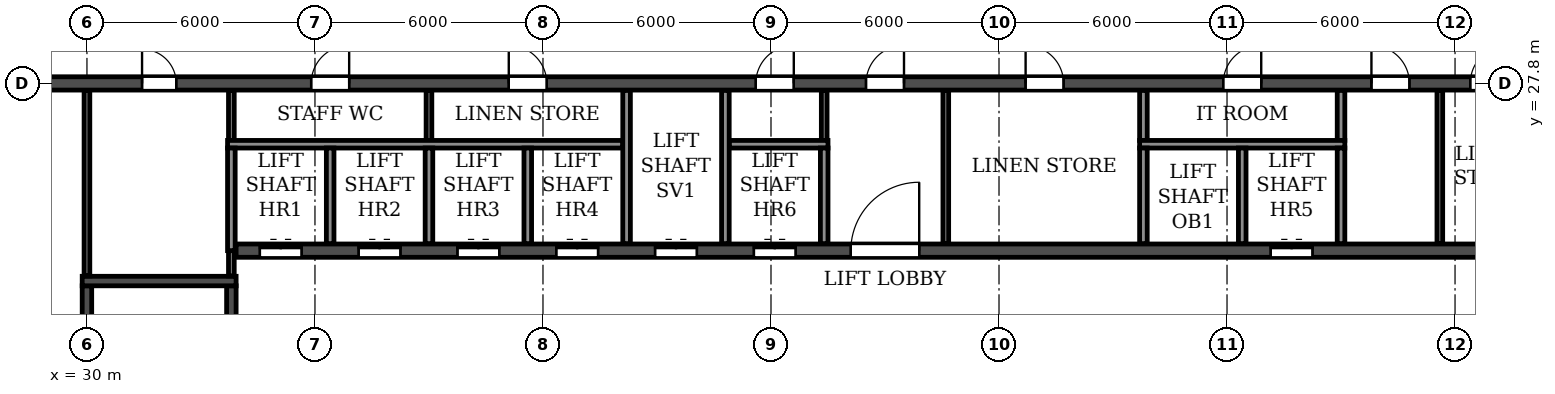
"""IFC4 building model, lengths in metres.
Left out: names, types, materials, properties, quantities, classifications, styles, units other than length and angle.
Written with IfcOpenShell. Run it as: python <this file> out.ifc"""

import sys

from ifc_helpers import new_model, si_unit, direction, frame, frame_2d, origin, place, context, subcontext, project, spatial, rectangle, extrude, element, fill, save


model = new_model("IFC4")
c1 = context("Model", 3, precision=1e-05, world=origin(), true_north=direction((0.0, 1.0)))
c2 = subcontext(c1, "Body", "Model", "MODEL_VIEW")
j1 = project(units=[si_unit("LENGTHUNIT", "METRE"), si_unit("PLANEANGLEUNIT", "RADIAN")], contexts=[c1])
p1 = place(None, origin())
s1 = spatial("IfcSite", under=j1, at=p1, CompositionType="ELEMENT")
p2 = place(p1, origin())
s2 = spatial("IfcBuilding", under=s1, at=p2, CompositionType="ELEMENT")
p3 = place(p2, frame((0.0, 0.0, 241.2)))
s3 = spatial("IfcBuildingStorey", under=s2, at=p3, CompositionType="ELEMENT", Elevation=241.2)
p4 = place(p3, frame((18.2, 27.8, 0.0), z_axis=(0.0, 0.0, 1.0), x_axis=(1.0, 0.0, 0.0)))
e1 = element("IfcWall", 1, at=p4, inside=s3, PredefinedType="SOLIDWALL", context=c2, shape_type="SweptSolid", body=[
    extrude(rectangle(XDim=65.6, YDim=0.35, at=frame_2d((32.8, 0.0))), origin(), (0.0, 0.0, 1.0), 3.08),
])
p5 = place(p4, frame((0.7, 0.0, 0.0)))
e2 = element("IfcOpeningElement", 2, at=p5, cuts=e1, PredefinedType="OPENING", context=c2, shape_type="SweptSolid", body=[
    extrude(rectangle(XDim=1.0, YDim=2.1, at=frame_2d((0.5, 1.05))), frame((0.0, 0.185, 0.0), z_axis=(0.0, -1.0, 0.0), x_axis=(1.0, 0.0, 0.0)), (0.0, 0.0, 1.0), 0.37),
])
p6 = place(p4, frame((4.05, 0.0, 0.0)))
e3 = element("IfcOpeningElement", 3, at=p6, cuts=e1, PredefinedType="OPENING", context=c2, shape_type="SweptSolid", body=[
    extrude(rectangle(XDim=0.9, YDim=2.1, at=frame_2d((0.45, 1.05))), frame((0.0, 0.185, 0.0), z_axis=(0.0, -1.0, 0.0), x_axis=(1.0, 0.0, 0.0)), (0.0, 0.0, 1.0), 0.37),
])
p7 = place(p4, frame((13.25, 0.0, 0.0)))
e4 = element("IfcOpeningElement", 4, at=p7, cuts=e1, PredefinedType="OPENING", context=c2, shape_type="SweptSolid", body=[
    extrude(rectangle(XDim=0.9, YDim=2.1, at=frame_2d((0.45, 1.05))), frame((0.0, 0.185, 0.0), z_axis=(0.0, -1.0, 0.0), x_axis=(1.0, 0.0, 0.0)), (0.0, 0.0, 1.0), 0.37),
])
p8 = place(p4, frame((17.7, 0.0, 0.0)))
e5 = element("IfcOpeningElement", 5, at=p8, cuts=e1, PredefinedType="OPENING", context=c2, shape_type="SweptSolid", body=[
    extrude(rectangle(XDim=1.0, YDim=2.1, at=frame_2d((0.5, 1.05))), frame((0.0, 0.185, 0.0), z_axis=(0.0, -1.0, 0.0), x_axis=(1.0, 0.0, 0.0)), (0.0, 0.0, 1.0), 0.37),
])
p9 = place(p4, frame((22.9, 0.0, 0.0)))
e6 = element("IfcOpeningElement", 6, at=p9, cuts=e1, PredefinedType="OPENING", context=c2, shape_type="SweptSolid", body=[
    extrude(rectangle(XDim=1.0, YDim=2.1, at=frame_2d((0.5, 1.05))), frame((0.0, 0.185, 0.0), z_axis=(0.0, -1.0, 0.0), x_axis=(1.0, 0.0, 0.0)), (0.0, 0.0, 1.0), 0.37),
])
p10 = place(p4, frame((29.4, 0.0, 0.0)))
e7 = element("IfcOpeningElement", 7, at=p10, cuts=e1, PredefinedType="OPENING", context=c2, shape_type="SweptSolid", body=[
    extrude(rectangle(XDim=1.0, YDim=2.1, at=frame_2d((0.5, 1.05))), frame((0.0, 0.185, 0.0), z_axis=(0.0, -1.0, 0.0), x_axis=(1.0, 0.0, 0.0)), (0.0, 0.0, 1.0), 0.37),
])
p11 = place(p4, frame((32.3, 0.0, 0.0)))
e8 = element("IfcOpeningElement", 8, at=p11, cuts=e1, PredefinedType="OPENING", context=c2, shape_type="SweptSolid", body=[
    extrude(rectangle(XDim=1.0, YDim=2.1, at=frame_2d((0.5, 1.05))), frame((0.0, 0.185, 0.0), z_axis=(0.0, -1.0, 0.0), x_axis=(1.0, 0.0, 0.0)), (0.0, 0.0, 1.0), 0.37),
])
p12 = place(p4, frame((36.5, 0.0, 0.0)))
e9 = element("IfcOpeningElement", 9, at=p12, cuts=e1, PredefinedType="OPENING", context=c2, shape_type="SweptSolid", body=[
    extrude(rectangle(XDim=1.0, YDim=2.1, at=frame_2d((0.5, 1.05))), frame((0.0, 0.185, 0.0), z_axis=(0.0, -1.0, 0.0), x_axis=(1.0, 0.0, 0.0)), (0.0, 0.0, 1.0), 0.37),
])
p13 = place(p4, frame((41.7, 0.0, 0.0)))
e10 = element("IfcOpeningElement", 10, at=p13, cuts=e1, PredefinedType="OPENING", context=c2, shape_type="SweptSolid", body=[
    extrude(rectangle(XDim=1.0, YDim=2.1, at=frame_2d((0.5, 1.05))), frame((0.0, 0.185, 0.0), z_axis=(0.0, -1.0, 0.0), x_axis=(1.0, 0.0, 0.0)), (0.0, 0.0, 1.0), 0.37),
])
p14 = place(p4, frame((45.6, 0.0, 0.0)))
e11 = element("IfcOpeningElement", 11, at=p14, cuts=e1, PredefinedType="OPENING", context=c2, shape_type="SweptSolid", body=[
    extrude(rectangle(XDim=1.0, YDim=2.1, at=frame_2d((0.5, 1.05))), frame((0.0, 0.185, 0.0), z_axis=(0.0, -1.0, 0.0), x_axis=(1.0, 0.0, 0.0)), (0.0, 0.0, 1.0), 0.37),
])
p15 = place(p4, frame((48.2, 0.0, 0.0)))
e12 = element("IfcOpeningElement", 12, at=p15, cuts=e1, PredefinedType="OPENING", context=c2, shape_type="SweptSolid", body=[
    extrude(rectangle(XDim=1.0, YDim=2.1, at=frame_2d((0.5, 1.05))), frame((0.0, 0.185, 0.0), z_axis=(0.0, -1.0, 0.0), x_axis=(1.0, 0.0, 0.0)), (0.0, 0.0, 1.0), 0.37),
])
p16 = place(p4, frame((51.45, 0.0, 0.0)))
e13 = element("IfcOpeningElement", 13, at=p16, cuts=e1, PredefinedType="OPENING", context=c2, shape_type="SweptSolid", body=[
    extrude(rectangle(XDim=0.9, YDim=2.1, at=frame_2d((0.45, 1.05))), frame((0.0, 0.185, 0.0), z_axis=(0.0, -1.0, 0.0), x_axis=(1.0, 0.0, 0.0)), (0.0, 0.0, 1.0), 0.37),
])
p17 = place(p4, frame((60.65, 0.0, 0.0)))
e14 = element("IfcOpeningElement", 14, at=p17, cuts=e1, PredefinedType="OPENING", context=c2, shape_type="SweptSolid", body=[
    extrude(rectangle(XDim=0.9, YDim=2.1, at=frame_2d((0.45, 1.05))), frame((0.0, 0.185, 0.0), z_axis=(0.0, -1.0, 0.0), x_axis=(1.0, 0.0, 0.0)), (0.0, 0.0, 1.0), 0.37),
])
p18 = place(p4, frame((63.9, 0.0, 0.0)))
e15 = element("IfcOpeningElement", 15, at=p18, cuts=e1, PredefinedType="OPENING", context=c2, shape_type="SweptSolid", body=[
    extrude(rectangle(XDim=1.0, YDim=2.1, at=frame_2d((0.5, 1.05))), frame((0.0, 0.185, 0.0), z_axis=(0.0, -1.0, 0.0), x_axis=(1.0, 0.0, 0.0)), (0.0, 0.0, 1.0), 0.37),
])
p19 = place(p3, frame((33.925, 23.4, 0.0), z_axis=(0.0, 0.0, 1.0), x_axis=(1.0, 0.0, 0.0)))
e16 = element("IfcWall", 16, at=p19, inside=s3, PredefinedType="SOLIDWALL", context=c2, shape_type="SweptSolid", body=[
    extrude(rectangle(XDim=34.15, YDim=0.35, at=frame_2d((17.075, 0.0))), origin(), (0.0, 0.0, 1.0), 3.08),
])
p20 = place(p19, frame((16.175, 0.0, 0.0)))
e17 = element("IfcOpeningElement", 17, at=p20, cuts=e16, PredefinedType="OPENING", context=c2, shape_type="SweptSolid", body=[
    extrude(rectangle(XDim=1.8, YDim=2.1, at=frame_2d((0.9, 1.05))), frame((0.0, 0.185, 0.0), z_axis=(0.0, -1.0, 0.0), x_axis=(1.0, 0.0, 0.0)), (0.0, 0.0, 1.0), 0.37),
])
p21 = place(p19, frame((0.625, 0.0, 0.0)))
e18 = element("IfcOpeningElement", 18, at=p21, cuts=e16, PredefinedType="OPENING", context=c2, shape_type="SweptSolid", body=[
    extrude(rectangle(XDim=1.1, YDim=2.1, at=frame_2d((0.55, 1.05))), frame((0.0, 0.185, 0.0), z_axis=(0.0, -1.0, 0.0), x_axis=(1.0, 0.0, 0.0)), (0.0, 0.0, 1.0), 0.37),
])
p22 = place(p19, frame((3.225, 0.0, 0.0)))
e19 = element("IfcOpeningElement", 19, at=p22, cuts=e16, PredefinedType="OPENING", context=c2, shape_type="SweptSolid", body=[
    extrude(rectangle(XDim=1.1, YDim=2.1, at=frame_2d((0.55, 1.05))), frame((0.0, 0.185, 0.0), z_axis=(0.0, -1.0, 0.0), x_axis=(1.0, 0.0, 0.0)), (0.0, 0.0, 1.0), 0.37),
])
p23 = place(p19, frame((5.825, 0.0, 0.0)))
e20 = element("IfcOpeningElement", 20, at=p23, cuts=e16, PredefinedType="OPENING", context=c2, shape_type="SweptSolid", body=[
    extrude(rectangle(XDim=1.1, YDim=2.1, at=frame_2d((0.55, 1.05))), frame((0.0, 0.185, 0.0), z_axis=(0.0, -1.0, 0.0), x_axis=(1.0, 0.0, 0.0)), (0.0, 0.0, 1.0), 0.37),
])
p24 = place(p19, frame((8.425, 0.0, 0.0)))
e21 = element("IfcOpeningElement", 21, at=p24, cuts=e16, PredefinedType="OPENING", context=c2, shape_type="SweptSolid", body=[
    extrude(rectangle(XDim=1.1, YDim=2.1, at=frame_2d((0.55, 1.05))), frame((0.0, 0.185, 0.0), z_axis=(0.0, -1.0, 0.0), x_axis=(1.0, 0.0, 0.0)), (0.0, 0.0, 1.0), 0.37),
])
p25 = place(p19, frame((11.025, 0.0, 0.0)))
e22 = element("IfcOpeningElement", 22, at=p25, cuts=e16, PredefinedType="OPENING", context=c2, shape_type="SweptSolid", body=[
    extrude(rectangle(XDim=1.1, YDim=2.1, at=frame_2d((0.55, 1.05))), frame((0.0, 0.185, 0.0), z_axis=(0.0, -1.0, 0.0), x_axis=(1.0, 0.0, 0.0)), (0.0, 0.0, 1.0), 0.37),
])
p26 = place(p19, frame((13.625, 0.0, 0.0)))
e23 = element("IfcOpeningElement", 23, at=p26, cuts=e16, PredefinedType="OPENING", context=c2, shape_type="SweptSolid", body=[
    extrude(rectangle(XDim=1.1, YDim=2.1, at=frame_2d((0.55, 1.05))), frame((0.0, 0.185, 0.0), z_axis=(0.0, -1.0, 0.0), x_axis=(1.0, 0.0, 0.0)), (0.0, 0.0, 1.0), 0.37),
])
p27 = place(p19, frame((27.225, 0.0, 0.0)))
e24 = element("IfcOpeningElement", 24, at=p27, cuts=e16, PredefinedType="OPENING", context=c2, shape_type="SweptSolid", body=[
    extrude(rectangle(XDim=1.1, YDim=2.1, at=frame_2d((0.55, 1.05))), frame((0.0, 0.185, 0.0), z_axis=(0.0, -1.0, 0.0), x_axis=(1.0, 0.0, 0.0)), (0.0, 0.0, 1.0), 0.37),
])
p28 = place(p3, frame((30.0, 14.775, 0.0), z_axis=(0.0, 0.0, 1.0), x_axis=(0.0, 1.0, 0.0)))
e25 = element("IfcWall", 25, at=p28, inside=s3, PredefinedType="SOLIDWALL", context=c2, shape_type="SweptSolid", body=[
    extrude(rectangle(XDim=7.7, YDim=0.25, at=frame_2d((3.85, 0.0))), origin(), (0.0, 0.0, 1.0), 3.08),
])
p29 = place(p3, frame((33.8, 14.775, 0.0), z_axis=(0.0, 0.0, 1.0), x_axis=(0.0, 1.0, 0.0)))
e26 = element("IfcWall", 26, at=p29, inside=s3, PredefinedType="SOLIDWALL", context=c2, shape_type="SweptSolid", body=[
    extrude(rectangle(XDim=7.7, YDim=0.25, at=frame_2d((3.85, 0.0))), origin(), (0.0, 0.0, 1.0), 3.08),
])
p30 = place(p29, frame((0.525, 0.0, 0.0)))
e27 = element("IfcOpeningElement", 27, at=p30, cuts=e26, PredefinedType="OPENING", context=c2, shape_type="SweptSolid", body=[
    extrude(rectangle(XDim=1.0, YDim=2.1, at=frame_2d((0.5, 1.05))), frame((0.0, 0.135, 0.0), z_axis=(0.0, -1.0, 0.0), x_axis=(1.0, 0.0, 0.0)), (0.0, 0.0, 1.0), 0.27),
])
p31 = place(p3, frame((29.875, 22.6, 0.0), z_axis=(0.0, 0.0, 1.0), x_axis=(1.0, 0.0, 0.0)))
e28 = element("IfcWall", 28, at=p31, inside=s3, PredefinedType="SOLIDWALL", context=c2, shape_type="SweptSolid", body=[
    extrude(rectangle(XDim=4.05, YDim=0.25, at=frame_2d((2.025, 0.0))), origin(), (0.0, 0.0, 1.0), 3.08),
])
p32 = place(p3, frame((49.4, 26.3, 0.0), z_axis=(0.0, 0.0, 1.0), x_axis=(0.0, 1.0, 0.0)))
e29 = element("IfcWall", 29, at=p32, inside=s3, PredefinedType="PARTITIONING", context=c2, shape_type="SweptSolid", body=[
    extrude(rectangle(XDim=1.315, YDim=0.15, at=frame_2d((0.657, 0.0))), origin(), (0.0, 0.0, 1.0), 3.08),
])
p33 = place(p3, frame((52.6, 23.585, 0.0), z_axis=(0.0, 0.0, 1.0), x_axis=(0.0, 1.0, 0.0)))
e30 = element("IfcWall", 30, at=p33, inside=s3, PredefinedType="PARTITIONING", context=c2, shape_type="SweptSolid", body=[
    extrude(rectangle(XDim=4.03, YDim=0.15, at=frame_2d((2.015, 0.0))), origin(), (0.0, 0.0, 1.0), 3.08),
])
p34 = place(p3, frame((39.0, 26.3, 0.0), z_axis=(0.0, 0.0, 1.0), x_axis=(0.0, 1.0, 0.0)))
e31 = element("IfcWall", 31, at=p34, inside=s3, PredefinedType="PARTITIONING", context=c2, shape_type="SweptSolid", body=[
    extrude(rectangle(XDim=1.315, YDim=0.15, at=frame_2d((0.657, 0.0))), origin(), (0.0, 0.0, 1.0), 3.08),
])
p35 = place(p3, frame((65.6, 23.585, 0.0), z_axis=(0.0, 0.0, 1.0), x_axis=(0.0, 1.0, 0.0)))
e32 = element("IfcWall", 32, at=p35, inside=s3, PredefinedType="PARTITIONING", context=c2, shape_type="SweptSolid", body=[
    extrude(rectangle(XDim=4.03, YDim=0.15, at=frame_2d((2.015, 0.0))), origin(), (0.0, 0.0, 1.0), 3.08),
])
for number, where, z_axis, x_axis in (
    (33, (57.8, 26.3, 0.0), (0.0, 0.0, 1.0), (0.0, 1.0, 0.0)),
    (34, (63.0, 26.3, 0.0), (0.0, 0.0, 1.0), (0.0, 1.0, 0.0)),
):
    element("IfcWall", number, at=place(p3, frame(where, z_axis=z_axis, x_axis=x_axis)), inside=s3, PredefinedType="PARTITIONING", context=c2, shape_type="SweptSolid", body=[
        extrude(rectangle(XDim=1.315, YDim=0.2, at=frame_2d((0.657, 0.0))), origin(), (0.0, 0.0, 1.0), 3.08),
    ])
p36 = place(p3, frame((30.0, 22.735, 0.0), z_axis=(0.0, 0.0, 1.0), x_axis=(0.0, 1.0, 0.0)))
e35 = element("IfcWall", 35, at=p36, inside=s3, PredefinedType="PARTITIONING", context=c2, shape_type="SweptSolid", body=[
    extrude(rectangle(XDim=4.88, YDim=0.15, at=frame_2d((2.44, 0.0))), origin(), (0.0, 0.0, 1.0), 3.08),
])
p37 = place(p3, frame((33.8, 22.735, 0.0), z_axis=(0.0, 0.0, 1.0), x_axis=(0.0, 1.0, 0.0)))
e36 = element("IfcWall", 36, at=p37, inside=s3, PredefinedType="PARTITIONING", context=c2, shape_type="SweptSolid", body=[
    extrude(rectangle(XDim=0.665, YDim=0.15, at=frame_2d((0.333, 0.0))), origin(), (0.0, 0.0, 1.0), 3.08),
])
p38 = place(p3, frame((33.8, 26.3, 0.0), z_axis=(0.0, 0.0, 1.0), x_axis=(0.0, 1.0, 0.0)))
e37 = element("IfcWall", 37, at=p38, inside=s3, PredefinedType="PARTITIONING", context=c2, shape_type="SweptSolid", body=[
    extrude(rectangle(XDim=1.315, YDim=0.15, at=frame_2d((0.657, 0.0))), origin(), (0.0, 0.0, 1.0), 3.08),
])
p39 = place(p3, frame((33.7, 26.2, 0.0), z_axis=(0.0, 0.0, 1.0), x_axis=(1.0, 0.0, 0.0)))
e38 = element("IfcWall", 38, at=p39, inside=s3, PredefinedType="PARTITIONING", context=c2, shape_type="SweptSolid", body=[
    extrude(rectangle(XDim=10.4, YDim=0.2, at=frame_2d((5.2, 0.0))), origin(), (0.0, 0.0, 1.0), 3.08),
])
p40 = place(p3, frame((46.9, 26.2, 0.0), z_axis=(0.0, 0.0, 1.0), x_axis=(1.0, 0.0, 0.0)))
e39 = element("IfcWall", 39, at=p40, inside=s3, PredefinedType="PARTITIONING", context=c2, shape_type="SweptSolid", body=[
    extrude(rectangle(XDim=2.6, YDim=0.2, at=frame_2d((1.3, 0.0))), origin(), (0.0, 0.0, 1.0), 3.08),
])
p41 = place(p3, frame((57.7, 26.2, 0.0), z_axis=(0.0, 0.0, 1.0), x_axis=(1.0, 0.0, 0.0)))
e40 = element("IfcWall", 40, at=p41, inside=s3, PredefinedType="PARTITIONING", context=c2, shape_type="SweptSolid", body=[
    extrude(rectangle(XDim=5.4, YDim=0.2, at=frame_2d((2.7, 0.0))), origin(), (0.0, 0.0, 1.0), 3.08),
])
p42 = place(p3, frame((33.8, 23.4, 0.0), z_axis=(0.0, 0.0, 1.0), x_axis=(0.0, 1.0, 0.0)))
e41 = element("IfcWall", 41, at=p42, inside=s3, PredefinedType="PARTITIONING", context=c2, shape_type="SweptSolid", body=[
    extrude(rectangle(XDim=2.7, YDim=0.2, at=frame_2d((1.35, 0.0))), origin(), (0.0, 0.0, 1.0), 3.08),
])
for number, where, z_axis, x_axis in (
    (42, (36.4, 23.585, 0.0), (0.0, 0.0, 1.0), (0.0, 1.0, 0.0)),
    (43, (39.0, 23.585, 0.0), (0.0, 0.0, 1.0), (0.0, 1.0, 0.0)),
    (44, (41.6, 23.585, 0.0), (0.0, 0.0, 1.0), (0.0, 1.0, 0.0)),
):
    element("IfcWall", number, at=place(p3, frame(where, z_axis=z_axis, x_axis=x_axis)), inside=s3, PredefinedType="PARTITIONING", context=c2, shape_type="SweptSolid", body=[
        extrude(rectangle(XDim=2.515, YDim=0.2, at=frame_2d((1.258, 0.0))), origin(), (0.0, 0.0, 1.0), 3.08),
    ])
for number, where, z_axis, x_axis in (
    (45, (44.2, 23.585, 0.0), (0.0, 0.0, 1.0), (0.0, 1.0, 0.0)),
    (46, (46.8, 23.585, 0.0), (0.0, 0.0, 1.0), (0.0, 1.0, 0.0)),
):
    element("IfcWall", number, at=place(p3, frame(where, z_axis=z_axis, x_axis=x_axis)), inside=s3, PredefinedType="PARTITIONING", context=c2, shape_type="SweptSolid", body=[
        extrude(rectangle(XDim=4.03, YDim=0.2, at=frame_2d((2.015, 0.0))), origin(), (0.0, 0.0, 1.0), 3.08),
    ])
for number, where, z_axis, x_axis in (
    (47, (49.4, 23.585, 0.0), (0.0, 0.0, 1.0), (0.0, 1.0, 0.0)),
    (48, (57.8, 23.585, 0.0), (0.0, 0.0, 1.0), (0.0, 1.0, 0.0)),
    (49, (60.4, 23.585, 0.0), (0.0, 0.0, 1.0), (0.0, 1.0, 0.0)),
    (50, (63.0, 23.585, 0.0), (0.0, 0.0, 1.0), (0.0, 1.0, 0.0)),
):
    element("IfcWall", number, at=place(p3, frame(where, z_axis=z_axis, x_axis=x_axis)), inside=s3, PredefinedType="PARTITIONING", context=c2, shape_type="SweptSolid", body=[
        extrude(rectangle(XDim=2.515, YDim=0.2, at=frame_2d((1.258, 0.0))), origin(), (0.0, 0.0, 1.0), 3.08),
    ])
p43 = place(p7, origin())
e51 = element("IfcDoor", 51, at=p43, inside=s3, OperationType="SINGLE_SWING_LEFT", PredefinedType="DOOR", context=c2, shape_type="SweptSolid", body=[
    extrude(rectangle(XDim=0.9, YDim=2.1, at=frame_2d((0.45, 1.05))), frame((0.0, 0.025, 0.0), z_axis=(0.0, -1.0, 0.0), x_axis=(1.0, 0.0, 0.0)), (0.0, 0.0, 1.0), 0.05),
])
fill(e4, e51)
p44 = place(p8, origin())
e52 = element("IfcDoor", 52, at=p44, inside=s3, OperationType="SINGLE_SWING_RIGHT", PredefinedType="DOOR", context=c2, shape_type="SweptSolid", body=[
    extrude(rectangle(XDim=1.0, YDim=2.1, at=frame_2d((0.5, 1.05))), frame((0.0, 0.025, 0.0), z_axis=(0.0, -1.0, 0.0), x_axis=(1.0, 0.0, 0.0)), (0.0, 0.0, 1.0), 0.05),
])
fill(e5, e52)
p45 = place(p9, origin())
e53 = element("IfcDoor", 53, at=p45, inside=s3, OperationType="SINGLE_SWING_LEFT", PredefinedType="DOOR", context=c2, shape_type="SweptSolid", body=[
    extrude(rectangle(XDim=1.0, YDim=2.1, at=frame_2d((0.5, 1.05))), frame((0.0, 0.025, 0.0), z_axis=(0.0, -1.0, 0.0), x_axis=(1.0, 0.0, 0.0)), (0.0, 0.0, 1.0), 0.05),
])
fill(e6, e53)
p46 = place(p10, origin())
e54 = element("IfcDoor", 54, at=p46, inside=s3, OperationType="SINGLE_SWING_RIGHT", PredefinedType="DOOR", context=c2, shape_type="SweptSolid", body=[
    extrude(rectangle(XDim=1.0, YDim=2.1, at=frame_2d((0.5, 1.05))), frame((0.0, 0.025, 0.0), z_axis=(0.0, -1.0, 0.0), x_axis=(1.0, 0.0, 0.0)), (0.0, 0.0, 1.0), 0.05),
])
fill(e7, e54)
p47 = place(p11, origin())
e55 = element("IfcDoor", 55, at=p47, inside=s3, OperationType="SINGLE_SWING_RIGHT", PredefinedType="DOOR", context=c2, shape_type="SweptSolid", body=[
    extrude(rectangle(XDim=1.0, YDim=2.1, at=frame_2d((0.5, 1.05))), frame((0.0, 0.025, 0.0), z_axis=(0.0, -1.0, 0.0), x_axis=(1.0, 0.0, 0.0)), (0.0, 0.0, 1.0), 0.05),
])
fill(e8, e55)
p48 = place(p12, origin())
e56 = element("IfcDoor", 56, at=p48, inside=s3, OperationType="SINGLE_SWING_LEFT", PredefinedType="DOOR", context=c2, shape_type="SweptSolid", body=[
    extrude(rectangle(XDim=1.0, YDim=2.1, at=frame_2d((0.5, 1.05))), frame((0.0, 0.025, 0.0), z_axis=(0.0, -1.0, 0.0), x_axis=(1.0, 0.0, 0.0)), (0.0, 0.0, 1.0), 0.05),
])
fill(e9, e56)
p49 = place(p13, origin())
e57 = element("IfcDoor", 57, at=p49, inside=s3, OperationType="SINGLE_SWING_RIGHT", PredefinedType="DOOR", context=c2, shape_type="SweptSolid", body=[
    extrude(rectangle(XDim=1.0, YDim=2.1, at=frame_2d((0.5, 1.05))), frame((0.0, 0.025, 0.0), z_axis=(0.0, -1.0, 0.0), x_axis=(1.0, 0.0, 0.0)), (0.0, 0.0, 1.0), 0.05),
])
fill(e10, e57)
p50 = place(p14, origin())
e58 = element("IfcDoor", 58, at=p50, inside=s3, OperationType="SINGLE_SWING_LEFT", PredefinedType="DOOR", context=c2, shape_type="SweptSolid", body=[
    extrude(rectangle(XDim=1.0, YDim=2.1, at=frame_2d((0.5, 1.05))), frame((0.0, 0.025, 0.0), z_axis=(0.0, -1.0, 0.0), x_axis=(1.0, 0.0, 0.0)), (0.0, 0.0, 1.0), 0.05),
])
fill(e11, e58)
p51 = place(p15, origin())
e59 = element("IfcDoor", 59, at=p51, inside=s3, OperationType="SINGLE_SWING_RIGHT", PredefinedType="DOOR", context=c2, shape_type="SweptSolid", body=[
    extrude(rectangle(XDim=1.0, YDim=2.1, at=frame_2d((0.5, 1.05))), frame((0.0, 0.025, 0.0), z_axis=(0.0, -1.0, 0.0), x_axis=(1.0, 0.0, 0.0)), (0.0, 0.0, 1.0), 0.05),
])
fill(e12, e59)
p52 = place(p20, origin())
e60 = element("IfcDoor", 60, at=p52, inside=s3, OperationType="DOUBLE_DOOR_SINGLE_SWING", PredefinedType="DOOR", context=c2, shape_type="SweptSolid", body=[
    extrude(rectangle(XDim=1.8, YDim=2.1, at=frame_2d((0.9, 1.05))), frame((0.0, 0.025, 0.0), z_axis=(0.0, -1.0, 0.0), x_axis=(1.0, 0.0, 0.0)), (0.0, 0.0, 1.0), 0.05),
])
fill(e17, e60)
p53 = place(p21, origin())
e61 = element("IfcDoor", 61, at=p53, inside=s3, OperationType="DOUBLE_DOOR_SLIDING", PredefinedType="DOOR", context=c2, shape_type="SweptSolid", body=[
    extrude(rectangle(XDim=1.1, YDim=2.1, at=frame_2d((0.55, 1.05))), frame((0.0, 0.025, 0.0), z_axis=(0.0, -1.0, 0.0), x_axis=(1.0, 0.0, 0.0)), (0.0, 0.0, 1.0), 0.05),
])
fill(e18, e61)
p54 = place(p22, origin())
e62 = element("IfcDoor", 62, at=p54, inside=s3, OperationType="DOUBLE_DOOR_SLIDING", PredefinedType="DOOR", context=c2, shape_type="SweptSolid", body=[
    extrude(rectangle(XDim=1.1, YDim=2.1, at=frame_2d((0.55, 1.05))), frame((0.0, 0.025, 0.0), z_axis=(0.0, -1.0, 0.0), x_axis=(1.0, 0.0, 0.0)), (0.0, 0.0, 1.0), 0.05),
])
fill(e19, e62)
p55 = place(p23, origin())
e63 = element("IfcDoor", 63, at=p55, inside=s3, OperationType="DOUBLE_DOOR_SLIDING", PredefinedType="DOOR", context=c2, shape_type="SweptSolid", body=[
    extrude(rectangle(XDim=1.1, YDim=2.1, at=frame_2d((0.55, 1.05))), frame((0.0, 0.025, 0.0), z_axis=(0.0, -1.0, 0.0), x_axis=(1.0, 0.0, 0.0)), (0.0, 0.0, 1.0), 0.05),
])
fill(e20, e63)
p56 = place(p24, origin())
e64 = element("IfcDoor", 64, at=p56, inside=s3, OperationType="DOUBLE_DOOR_SLIDING", PredefinedType="DOOR", context=c2, shape_type="SweptSolid", body=[
    extrude(rectangle(XDim=1.1, YDim=2.1, at=frame_2d((0.55, 1.05))), frame((0.0, 0.025, 0.0), z_axis=(0.0, -1.0, 0.0), x_axis=(1.0, 0.0, 0.0)), (0.0, 0.0, 1.0), 0.05),
])
fill(e21, e64)
p57 = place(p25, origin())
e65 = element("IfcDoor", 65, at=p57, inside=s3, OperationType="DOUBLE_DOOR_SLIDING", PredefinedType="DOOR", context=c2, shape_type="SweptSolid", body=[
    extrude(rectangle(XDim=1.1, YDim=2.1, at=frame_2d((0.55, 1.05))), frame((0.0, 0.025, 0.0), z_axis=(0.0, -1.0, 0.0), x_axis=(1.0, 0.0, 0.0)), (0.0, 0.0, 1.0), 0.05),
])
fill(e22, e65)
p58 = place(p26, origin())
e66 = element("IfcDoor", 66, at=p58, inside=s3, OperationType="DOUBLE_DOOR_SLIDING", PredefinedType="DOOR", context=c2, shape_type="SweptSolid", body=[
    extrude(rectangle(XDim=1.1, YDim=2.1, at=frame_2d((0.55, 1.05))), frame((0.0, 0.025, 0.0), z_axis=(0.0, -1.0, 0.0), x_axis=(1.0, 0.0, 0.0)), (0.0, 0.0, 1.0), 0.05),
])
fill(e23, e66)
p59 = place(p27, origin())
e67 = element("IfcDoor", 67, at=p59, inside=s3, OperationType="DOUBLE_DOOR_SLIDING", PredefinedType="DOOR", context=c2, shape_type="SweptSolid", body=[
    extrude(rectangle(XDim=1.1, YDim=2.1, at=frame_2d((0.55, 1.05))), frame((0.0, 0.025, 0.0), z_axis=(0.0, -1.0, 0.0), x_axis=(1.0, 0.0, 0.0)), (0.0, 0.0, 1.0), 0.05),
])
fill(e24, e67)
save(model, sys.argv[1])
